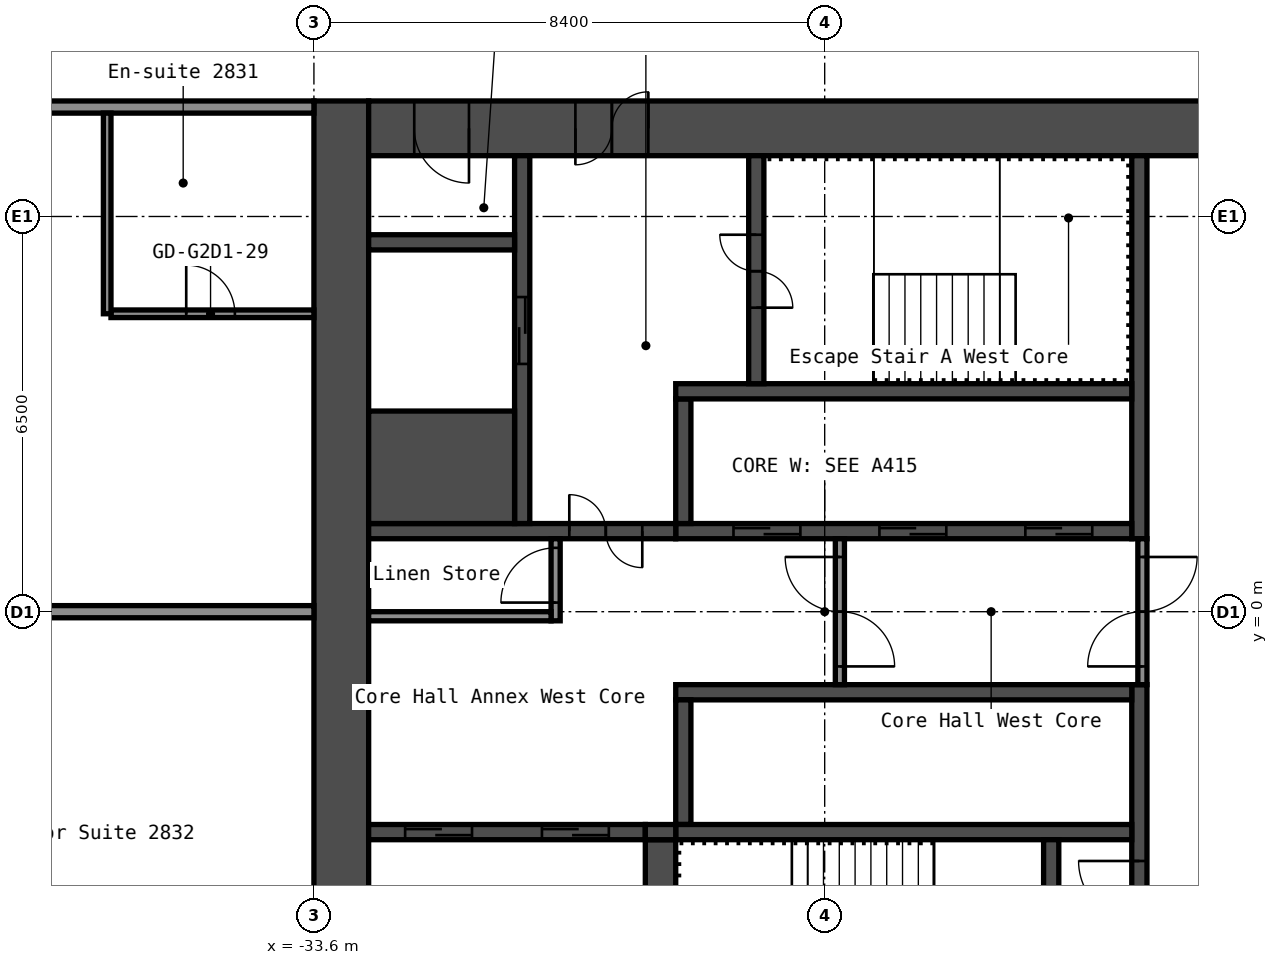
"""IFC4 building model, lengths in metres.
Left out: names, types, materials, properties, quantities, classifications, styles, units other than length and angle.
Written with IfcOpenShell. Run it as: python <this file> out.ifc"""

import sys

from ifc_helpers import new_model, si_unit, direction, frame, frame_2d, origin, place, context, subcontext, project, spatial, rectangle, extrude, element, fill, save


model = new_model("IFC4")
c1 = context("Model", 3, precision=1e-05, world=origin(), true_north=direction((0.0, 1.0)))
c2 = subcontext(c1, "Body", "Model", "MODEL_VIEW")
j1 = project(units=[si_unit("LENGTHUNIT", "METRE"), si_unit("PLANEANGLEUNIT", "RADIAN")], contexts=[c1])
p1 = place(None, origin())
s1 = spatial("IfcSite", under=j1, at=p1, CompositionType="ELEMENT")
p2 = place(p1, origin())
s2 = spatial("IfcBuilding", under=s1, at=p2, CompositionType="ELEMENT")
p3 = place(p2, frame((0.0, 0.0, 101.0)))
s3 = spatial("IfcBuildingStorey", under=s2, at=p3, CompositionType="ELEMENT", Elevation=101.0)
p4 = place(p3, frame((-33.15, -8.4, 0.0), z_axis=(0.0, 0.0, 1.0), x_axis=(0.0, 1.0, 0.0)))
e1 = element("IfcWall", 1, at=p4, inside=s3, PredefinedType="SHEAR", context=c2, shape_type="SweptSolid", body=[
    extrude(rectangle(XDim=16.8, YDim=0.9, at=frame_2d((8.4, 0.0))), origin(), (0.0, 0.0, 1.0), 2.8),
])
p5 = place(p3, frame((-32.7, 7.95, 0.0), z_axis=(0.0, 0.0, 1.0), x_axis=(1.0, 0.0, 0.0)))
e2 = element("IfcWall", 2, at=p5, inside=s3, PredefinedType="SHEAR", context=c2, shape_type="SweptSolid", body=[
    extrude(rectangle(XDim=15.0, YDim=0.9, at=frame_2d((7.5, 0.0))), origin(), (0.0, 0.0, 1.0), 2.8),
])
p6 = place(p5, frame((3.4, 0.0, 0.0)))
e3 = element("IfcOpeningElement", 3, at=p6, cuts=e2, PredefinedType="OPENING", context=c2, shape_type="SweptSolid", body=[
    extrude(rectangle(XDim=1.2, YDim=2.1, at=frame_2d((0.6, 1.05))), frame((0.0, 0.46, 0.0), z_axis=(0.0, -1.0, 0.0), x_axis=(1.0, 0.0, 0.0)), (0.0, 0.0, 1.0), 0.92),
])
p7 = place(p5, frame((0.75, 0.0, 0.0)))
e4 = element("IfcOpeningElement", 4, at=p7, cuts=e2, PredefinedType="OPENING", context=c2, shape_type="SweptSolid", body=[
    extrude(rectangle(XDim=0.9, YDim=2.1, at=frame_2d((0.45, 1.05))), frame((0.0, 0.46, 0.0), z_axis=(0.0, -1.0, 0.0), x_axis=(1.0, 0.0, 0.0)), (0.0, 0.0, 1.0), 0.92),
])
p8 = place(p3, frame((-20.025, 1.2, 0.0), z_axis=(0.0, 0.0, 1.0), x_axis=(0.0, 1.0, 0.0)))
e5 = element("IfcWall", 5, at=p8, inside=s3, PredefinedType="SHEAR", context=c2, shape_type="SweptSolid", body=[
    extrude(rectangle(XDim=6.3, YDim=0.25, at=frame_2d((3.15, 0.0))), origin(), (0.0, 0.0, 1.0), 2.8),
])
p9 = place(p3, frame((-20.025, -7.5, 0.0), z_axis=(0.0, 0.0, 1.0), x_axis=(0.0, 1.0, 0.0)))
e6 = element("IfcWall", 6, at=p9, inside=s3, PredefinedType="SHEAR", context=c2, shape_type="SweptSolid", body=[
    extrude(rectangle(XDim=6.3, YDim=0.25, at=frame_2d((3.15, 0.0))), origin(), (0.0, 0.0, 1.0), 2.8),
])
p10 = place(p9, frame((2.4, 0.0, 0.0)))
e7 = element("IfcOpeningElement", 7, at=p10, cuts=e6, PredefinedType="OPENING", context=c2, shape_type="SweptSolid", body=[
    extrude(rectangle(XDim=1.0, YDim=2.1, at=frame_2d((0.5, 1.05))), frame((0.0, 0.135, 0.0), z_axis=(0.0, -1.0, 0.0), x_axis=(1.0, 0.0, 0.0)), (0.0, 0.0, 1.0), 0.27),
])
p11 = place(p3, frame((-27.65, 1.325, 0.0), z_axis=(0.0, 0.0, 1.0), x_axis=(1.0, 0.0, 0.0)))
e8 = element("IfcWall", 8, at=p11, inside=s3, PredefinedType="SHEAR", context=c2, shape_type="SweptSolid", body=[
    extrude(rectangle(XDim=7.5, YDim=0.25, at=frame_2d((3.75, 0.0))), origin(), (0.0, 0.0, 1.0), 2.8),
])
p12 = place(p11, frame((5.75, 0.0, 0.0)))
e9 = element("IfcOpeningElement", 9, at=p12, cuts=e8, PredefinedType="OPENING", context=c2, shape_type="SweptSolid", body=[
    extrude(rectangle(XDim=1.1, YDim=2.1, at=frame_2d((0.55, 1.05))), frame((0.0, 0.135, 0.0), z_axis=(0.0, -1.0, 0.0), x_axis=(1.0, 0.0, 0.0)), (0.0, 0.0, 1.0), 0.27),
])
p13 = place(p11, frame((3.35, 0.0, 0.0)))
e10 = element("IfcOpeningElement", 10, at=p13, cuts=e8, PredefinedType="OPENING", context=c2, shape_type="SweptSolid", body=[
    extrude(rectangle(XDim=1.1, YDim=2.1, at=frame_2d((0.55, 1.05))), frame((0.0, 0.135, 0.0), z_axis=(0.0, -1.0, 0.0), x_axis=(1.0, 0.0, 0.0)), (0.0, 0.0, 1.0), 0.27),
])
p14 = place(p11, frame((0.95, 0.0, 0.0)))
e11 = element("IfcOpeningElement", 11, at=p14, cuts=e8, PredefinedType="OPENING", context=c2, shape_type="SweptSolid", body=[
    extrude(rectangle(XDim=1.1, YDim=2.1, at=frame_2d((0.55, 1.05))), frame((0.0, 0.135, 0.0), z_axis=(0.0, -1.0, 0.0), x_axis=(1.0, 0.0, 0.0)), (0.0, 0.0, 1.0), 0.27),
])
p15 = place(p3, frame((-27.525, 1.45, 0.0), z_axis=(0.0, 0.0, 1.0), x_axis=(0.0, 1.0, 0.0)))
e12 = element("IfcWall", 12, at=p15, inside=s3, PredefinedType="SHEAR", context=c2, shape_type="SweptSolid", body=[
    extrude(rectangle(XDim=2.05, YDim=0.25, at=frame_2d((1.025, 0.0))), origin(), (0.0, 0.0, 1.0), 2.8),
])
p16 = place(p3, frame((-27.65, 3.625, 0.0), z_axis=(0.0, 0.0, 1.0), x_axis=(1.0, 0.0, 0.0)))
e13 = element("IfcWall", 13, at=p16, inside=s3, PredefinedType="SHEAR", context=c2, shape_type="SweptSolid", body=[
    extrude(rectangle(XDim=7.5, YDim=0.25, at=frame_2d((3.75, 0.0))), origin(), (0.0, 0.0, 1.0), 2.8),
])
p17 = place(p3, frame((-26.325, 3.75, 0.0), z_axis=(0.0, 0.0, 1.0), x_axis=(0.0, 1.0, 0.0)))
e14 = element("IfcWall", 14, at=p17, inside=s3, PredefinedType="SHEAR", context=c2, shape_type="SweptSolid", body=[
    extrude(rectangle(XDim=3.75, YDim=0.25, at=frame_2d((1.875, 0.0))), origin(), (0.0, 0.0, 1.0), 2.8),
])
p18 = place(p17, frame((1.25, 0.0, 0.0)))
e15 = element("IfcOpeningElement", 15, at=p18, cuts=e14, PredefinedType="OPENING", context=c2, shape_type="SweptSolid", body=[
    extrude(rectangle(XDim=1.2, YDim=2.1, at=frame_2d((0.6, 1.05))), frame((0.0, 0.135, 0.0), z_axis=(0.0, -1.0, 0.0), x_axis=(1.0, 0.0, 0.0)), (0.0, 0.0, 1.0), 0.27),
])
p19 = place(p3, frame((-32.7, 1.325, 0.0), z_axis=(0.0, 0.0, 1.0), x_axis=(1.0, 0.0, 0.0)))
e16 = element("IfcWall", 16, at=p19, inside=s3, PredefinedType="SHEAR", context=c2, shape_type="SweptSolid", body=[
    extrude(rectangle(XDim=5.05, YDim=0.25, at=frame_2d((2.525, 0.0))), origin(), (0.0, 0.0, 1.0), 2.8),
])
p20 = place(p19, frame((3.3, 0.0, 0.0)))
e17 = element("IfcOpeningElement", 17, at=p20, cuts=e16, PredefinedType="OPENING", context=c2, shape_type="SweptSolid", body=[
    extrude(rectangle(XDim=1.2, YDim=2.1, at=frame_2d((0.6, 1.05))), frame((0.0, 0.135, 0.0), z_axis=(0.0, -1.0, 0.0), x_axis=(1.0, 0.0, 0.0)), (0.0, 0.0, 1.0), 0.27),
])
p21 = place(p3, frame((-30.175, 1.45, 0.0), z_axis=(0.0, 0.0, 1.0), x_axis=(0.0, 1.0, 0.0)))
e18 = element("IfcWall", 18, at=p21, inside=s3, PredefinedType="SHEAR", context=c2, shape_type="SweptSolid", body=[
    extrude(rectangle(XDim=6.05, YDim=0.25, at=frame_2d((3.025, 0.0))), origin(), (0.0, 0.0, 1.0), 2.8),
])
p22 = place(p21, frame((2.625, 0.0, 0.0)))
e19 = element("IfcOpeningElement", 19, at=p22, cuts=e18, PredefinedType="OPENING", context=c2, shape_type="SweptSolid", body=[
    extrude(rectangle(XDim=1.1, YDim=2.1, at=frame_2d((0.55, 1.05))), frame((0.0, 0.135, 0.0), z_axis=(0.0, -1.0, 0.0), x_axis=(1.0, 0.0, 0.0)), (0.0, 0.0, 1.0), 0.27),
])
p23 = place(p3, frame((-32.7, 2.375, 0.0), z_axis=(0.0, 0.0, 1.0), x_axis=(1.0, 0.0, 0.0)))
e20 = element("IfcWall", 20, at=p23, inside=s3, PredefinedType="SHEAR", context=c2, shape_type="SweptSolid", body=[
    extrude(rectangle(XDim=2.4, YDim=1.85, at=frame_2d((1.2, 0.0))), origin(), (0.0, 0.0, 1.0), 2.8),
])
p24 = place(p3, frame((-32.7, 6.075, 0.0), z_axis=(0.0, 0.0, 1.0), x_axis=(1.0, 0.0, 0.0)))
e21 = element("IfcWall", 21, at=p24, inside=s3, PredefinedType="SHEAR", context=c2, shape_type="SweptSolid", body=[
    extrude(rectangle(XDim=2.4, YDim=0.25, at=frame_2d((1.2, 0.0))), origin(), (0.0, 0.0, 1.0), 2.8),
])
p25 = place(p3, frame((-27.65, -1.325, 0.0), z_axis=(0.0, 0.0, 1.0), x_axis=(1.0, 0.0, 0.0)))
e22 = element("IfcWall", 22, at=p25, inside=s3, PredefinedType="SHEAR", context=c2, shape_type="SweptSolid", body=[
    extrude(rectangle(XDim=7.5, YDim=0.25, at=frame_2d((3.75, 0.0))), origin(), (0.0, 0.0, 1.0), 2.8),
])
p26 = place(p3, frame((-27.525, -3.5, 0.0), z_axis=(0.0, 0.0, 1.0), x_axis=(0.0, 1.0, 0.0)))
e23 = element("IfcWall", 23, at=p26, inside=s3, PredefinedType="SHEAR", context=c2, shape_type="SweptSolid", body=[
    extrude(rectangle(XDim=2.05, YDim=0.25, at=frame_2d((1.025, 0.0))), origin(), (0.0, 0.0, 1.0), 2.8),
])
p27 = place(p3, frame((-27.65, -3.625, 0.0), z_axis=(0.0, 0.0, 1.0), x_axis=(1.0, 0.0, 0.0)))
e24 = element("IfcWall", 24, at=p27, inside=s3, PredefinedType="SHEAR", context=c2, shape_type="SweptSolid", body=[
    extrude(rectangle(XDim=7.5, YDim=0.25, at=frame_2d((3.75, 0.0))), origin(), (0.0, 0.0, 1.0), 2.8),
])
p28 = place(p3, frame((-21.475, -7.5, 0.0), z_axis=(0.0, 0.0, 1.0), x_axis=(0.0, 1.0, 0.0)))
e25 = element("IfcWall", 25, at=p28, inside=s3, PredefinedType="SHEAR", context=c2, shape_type="SweptSolid", body=[
    extrude(rectangle(XDim=3.75, YDim=0.25, at=frame_2d((1.875, 0.0))), origin(), (0.0, 0.0, 1.0), 2.8),
])
p29 = place(p28, frame((1.3, 0.0, 0.0)))
e26 = element("IfcOpeningElement", 26, at=p29, cuts=e25, PredefinedType="OPENING", context=c2, shape_type="SweptSolid", body=[
    extrude(rectangle(XDim=1.2, YDim=2.1, at=frame_2d((0.6, 1.05))), frame((0.0, 0.135, 0.0), z_axis=(0.0, -1.0, 0.0), x_axis=(1.0, 0.0, 0.0)), (0.0, 0.0, 1.0), 0.27),
])
p30 = place(p3, frame((-27.9, -7.5, 0.0), z_axis=(0.0, 0.0, 1.0), x_axis=(0.0, 1.0, 0.0)))
e27 = element("IfcWall", 27, at=p30, inside=s3, PredefinedType="SHEAR", context=c2, shape_type="SweptSolid", body=[
    extrude(rectangle(XDim=3.75, YDim=0.5, at=frame_2d((1.875, 0.0))), origin(), (0.0, 0.0, 1.0), 2.8),
])
p31 = place(p3, frame((-32.7, -3.625, 0.0), z_axis=(0.0, 0.0, 1.0), x_axis=(1.0, 0.0, 0.0)))
e28 = element("IfcWall", 28, at=p31, inside=s3, PredefinedType="SHEAR", context=c2, shape_type="SweptSolid", body=[
    extrude(rectangle(XDim=4.55, YDim=0.25, at=frame_2d((2.275, 0.0))), origin(), (0.0, 0.0, 1.0), 2.8),
])
p32 = place(p31, frame((2.85, 0.0, 0.0)))
e29 = element("IfcOpeningElement", 29, at=p32, cuts=e28, PredefinedType="OPENING", context=c2, shape_type="SweptSolid", body=[
    extrude(rectangle(XDim=1.1, YDim=2.1, at=frame_2d((0.55, 1.05))), frame((0.0, 0.135, 0.0), z_axis=(0.0, -1.0, 0.0), x_axis=(1.0, 0.0, 0.0)), (0.0, 0.0, 1.0), 0.27),
])
p33 = place(p31, frame((0.6, 0.0, 0.0)))
e30 = element("IfcOpeningElement", 30, at=p33, cuts=e28, PredefinedType="OPENING", context=c2, shape_type="SweptSolid", body=[
    extrude(rectangle(XDim=1.1, YDim=2.1, at=frame_2d((0.55, 1.05))), frame((0.0, 0.135, 0.0), z_axis=(0.0, -1.0, 0.0), x_axis=(1.0, 0.0, 0.0)), (0.0, 0.0, 1.0), 0.27),
])
p34 = place(p3, frame((-28.15, -3.625, 0.0), z_axis=(0.0, 0.0, 1.0), x_axis=(1.0, 0.0, 0.0)))
e31 = element("IfcWall", 31, at=p34, inside=s3, PredefinedType="SHEAR", context=c2, shape_type="SweptSolid", body=[
    extrude(rectangle(XDim=0.5, YDim=0.25, at=frame_2d((0.25, 0.0))), origin(), (0.0, 0.0, 1.0), 2.8),
])
p35 = place(p3, frame((-19.975, -1.2, 0.0), z_axis=(0.0, 0.0, 1.0), x_axis=(0.0, 1.0, 0.0)))
e32 = element("IfcWall", 32, at=p35, inside=s3, PredefinedType="PARTITIONING", context=c2, shape_type="SweptSolid", body=[
    extrude(rectangle(XDim=2.4, YDim=0.15, at=frame_2d((1.2, 0.0))), origin(), (0.0, 0.0, 1.0), 2.8),
])
p36 = place(p35, frame((0.3, 0.0, 0.0)))
e33 = element("IfcOpeningElement", 33, at=p36, cuts=e32, PredefinedType="OPENING", context=c2, shape_type="SweptSolid", body=[
    extrude(rectangle(XDim=1.8, YDim=2.1, at=frame_2d((0.9, 1.05))), frame((0.0, 0.085, 0.0), z_axis=(0.0, -1.0, 0.0), x_axis=(1.0, 0.0, 0.0)), (0.0, 0.0, 1.0), 0.17),
])
p37 = place(p3, frame((-24.95, -1.2, 0.0), z_axis=(0.0, 0.0, 1.0), x_axis=(0.0, 1.0, 0.0)))
e34 = element("IfcWall", 34, at=p37, inside=s3, PredefinedType="PARTITIONING", context=c2, shape_type="SweptSolid", body=[
    extrude(rectangle(XDim=2.4, YDim=0.15, at=frame_2d((1.2, 0.0))), origin(), (0.0, 0.0, 1.0), 2.8),
])
p38 = place(p37, frame((0.3, 0.0, 0.0)))
e35 = element("IfcOpeningElement", 35, at=p38, cuts=e34, PredefinedType="OPENING", context=c2, shape_type="SweptSolid", body=[
    extrude(rectangle(XDim=1.8, YDim=2.1, at=frame_2d((0.9, 1.05))), frame((0.0, 0.085, 0.0), z_axis=(0.0, -1.0, 0.0), x_axis=(1.0, 0.0, 0.0)), (0.0, 0.0, 1.0), 0.17),
])
p39 = place(p3, frame((-29.625, -0.15, 0.0), z_axis=(0.0, 0.0, 1.0), x_axis=(0.0, 1.0, 0.0)))
e36 = element("IfcWall", 36, at=p39, inside=s3, PredefinedType="PARTITIONING", context=c2, shape_type="SweptSolid", body=[
    extrude(rectangle(XDim=1.35, YDim=0.15, at=frame_2d((0.675, 0.0))), origin(), (0.0, 0.0, 1.0), 2.8),
])
p40 = place(p39, frame((0.3, 0.0, 0.0)))
e37 = element("IfcOpeningElement", 37, at=p40, cuts=e36, PredefinedType="OPENING", context=c2, shape_type="SweptSolid", body=[
    extrude(rectangle(XDim=0.9, YDim=2.1, at=frame_2d((0.45, 1.05))), frame((0.0, 0.085, 0.0), z_axis=(0.0, -1.0, 0.0), x_axis=(1.0, 0.0, 0.0)), (0.0, 0.0, 1.0), 0.17),
])
p41 = place(p3, frame((-32.7, -0.075, 0.0), z_axis=(0.0, 0.0, 1.0), x_axis=(1.0, 0.0, 0.0)))
e38 = element("IfcWall", 38, at=p41, inside=s3, PredefinedType="PARTITIONING", context=c2, shape_type="SweptSolid", body=[
    extrude(rectangle(XDim=3.0, YDim=0.15, at=frame_2d((1.5, 0.0))), origin(), (0.0, 0.0, 1.0), 2.8),
])
p42 = place(p3, frame((-43.9, 0.0, 0.0), z_axis=(0.0, 0.0, 1.0), x_axis=(1.0, 0.0, 0.0)))
e39 = element("IfcWall", 39, at=p42, inside=s3, PredefinedType="PARTITIONING", context=c2, shape_type="SweptSolid", body=[
    extrude(rectangle(XDim=10.3, YDim=0.2, at=frame_2d((5.15, 0.0))), origin(), (0.0, 0.0, 1.0), 2.8),
])
p43 = place(p3, frame((-36.938, 4.9, 0.0), z_axis=(0.0, 0.0, 1.0), x_axis=(1.0, 0.0, 0.0)))
e40 = element("IfcWall", 40, at=p43, inside=s3, PredefinedType="PARTITIONING", context=c2, shape_type="SweptSolid", body=[
    extrude(rectangle(XDim=3.337, YDim=0.125, at=frame_2d((1.669, 0.0))), origin(), (0.0, 0.0, 1.0), 2.8),
])
p44 = place(p43, frame((1.238, 0.0, 0.0)))
e41 = element("IfcOpeningElement", 41, at=p44, cuts=e40, PredefinedType="OPENING", context=c2, shape_type="SweptSolid", body=[
    extrude(rectangle(XDim=0.8, YDim=2.1, at=frame_2d((0.4, 1.05))), frame((0.0, 0.073, 0.0), z_axis=(0.0, -1.0, 0.0), x_axis=(1.0, 0.0, 0.0)), (0.0, 0.0, 1.0), 0.145),
])
p45 = place(p3, frame((-44.0, 8.3, 0.0), z_axis=(0.0, 0.0, 1.0), x_axis=(1.0, 0.0, 0.0)))
e42 = element("IfcWall", 42, at=p45, inside=s3, PredefinedType="PARTITIONING", context=c2, shape_type="SweptSolid", body=[
    extrude(rectangle(XDim=10.4, YDim=0.2, at=frame_2d((5.2, 0.0))), origin(), (0.0, 0.0, 1.0), 2.8),
])
p46 = place(p45, frame((3.05, 0.0, 0.0)))
e43 = element("IfcOpeningElement", 43, at=p46, cuts=e42, PredefinedType="OPENING", context=c2, shape_type="SweptSolid", body=[
    extrude(rectangle(XDim=1.0, YDim=2.1, at=frame_2d((0.5, 1.05))), frame((0.0, 0.11, 0.0), z_axis=(0.0, -1.0, 0.0), x_axis=(1.0, 0.0, 0.0)), (0.0, 0.0, 1.0), 0.22),
])
p47 = place(p3, frame((-37.0, 4.9, 0.0), z_axis=(0.0, 0.0, 1.0), x_axis=(0.0, 1.0, 0.0)))
e44 = element("IfcWall", 44, at=p47, inside=s3, PredefinedType="PARTITIONING", context=c2, shape_type="SweptSolid", body=[
    extrude(rectangle(XDim=3.3, YDim=0.125, at=frame_2d((1.65, 0.0))), origin(), (0.0, 0.0, 1.0), 2.8),
])
p48 = place(p6, origin())
e45 = element("IfcDoor", 45, at=p48, inside=s3, OperationType="DOUBLE_DOOR_SINGLE_SWING", PredefinedType="DOOR", context=c2, shape_type="SweptSolid", body=[
    extrude(rectangle(XDim=1.2, YDim=2.1, at=frame_2d((0.6, 1.05))), frame((0.0, 0.025, 0.0), z_axis=(0.0, -1.0, 0.0), x_axis=(1.0, 0.0, 0.0)), (0.0, 0.0, 1.0), 0.05),
])
fill(e3, e45)
p49 = place(p7, origin())
e46 = element("IfcDoor", 46, at=p49, inside=s3, OperationType="SINGLE_SWING_RIGHT", PredefinedType="DOOR", context=c2, shape_type="SweptSolid", body=[
    extrude(rectangle(XDim=0.9, YDim=2.1, at=frame_2d((0.45, 1.05))), frame((0.0, 0.025, 0.0), z_axis=(0.0, -1.0, 0.0), x_axis=(1.0, 0.0, 0.0)), (0.0, 0.0, 1.0), 0.05),
])
fill(e4, e46)
p50 = place(p18, origin())
e47 = element("IfcDoor", 47, at=p50, inside=s3, OperationType="DOUBLE_DOOR_SINGLE_SWING", PredefinedType="DOOR", context=c2, shape_type="SweptSolid", body=[
    extrude(rectangle(XDim=1.2, YDim=2.1, at=frame_2d((0.6, 1.05))), frame((0.0, 0.025, 0.0), z_axis=(0.0, -1.0, 0.0), x_axis=(1.0, 0.0, 0.0)), (0.0, 0.0, 1.0), 0.05),
])
fill(e15, e47)
p51 = place(p10, origin())
e48 = element("IfcDoor", 48, at=p51, inside=s3, OperationType="SINGLE_SWING_LEFT", PredefinedType="DOOR", context=c2, shape_type="SweptSolid", body=[
    extrude(rectangle(XDim=1.0, YDim=2.1, at=frame_2d((0.5, 1.05))), frame((0.0, 0.025, 0.0), z_axis=(0.0, -1.0, 0.0), x_axis=(1.0, 0.0, 0.0)), (0.0, 0.0, 1.0), 0.05),
])
fill(e7, e48)
p52 = place(p20, origin())
e49 = element("IfcDoor", 49, at=p52, inside=s3, OperationType="DOUBLE_DOOR_SINGLE_SWING", PredefinedType="DOOR", context=c2, shape_type="SweptSolid", body=[
    extrude(rectangle(XDim=1.2, YDim=2.1, at=frame_2d((0.6, 1.05))), frame((0.0, 0.025, 0.0), z_axis=(0.0, -1.0, 0.0), x_axis=(1.0, 0.0, 0.0)), (0.0, 0.0, 1.0), 0.05),
])
fill(e17, e49)
p53 = place(p36, origin())
e50 = element("IfcDoor", 50, at=p53, inside=s3, OperationType="DOUBLE_DOOR_SINGLE_SWING", PredefinedType="DOOR", context=c2, shape_type="SweptSolid", body=[
    extrude(rectangle(XDim=1.8, YDim=2.1, at=frame_2d((0.9, 1.05))), frame((0.0, 0.025, 0.0), z_axis=(0.0, -1.0, 0.0), x_axis=(1.0, 0.0, 0.0)), (0.0, 0.0, 1.0), 0.05),
])
fill(e33, e50)
p54 = place(p38, origin())
e51 = element("IfcDoor", 51, at=p54, inside=s3, OperationType="DOUBLE_DOOR_SINGLE_SWING", PredefinedType="DOOR", context=c2, shape_type="SweptSolid", body=[
    extrude(rectangle(XDim=1.8, YDim=2.1, at=frame_2d((0.9, 1.05))), frame((0.0, 0.025, 0.0), z_axis=(0.0, -1.0, 0.0), x_axis=(1.0, 0.0, 0.0)), (0.0, 0.0, 1.0), 0.05),
])
fill(e35, e51)
p55 = place(p40, origin())
e52 = element("IfcDoor", 52, at=p55, inside=s3, OperationType="SINGLE_SWING_RIGHT", PredefinedType="DOOR", context=c2, shape_type="SweptSolid", body=[
    extrude(rectangle(XDim=0.9, YDim=2.1, at=frame_2d((0.45, 1.05))), frame((0.0, 0.025, 0.0), z_axis=(0.0, -1.0, 0.0), x_axis=(1.0, 0.0, 0.0)), (0.0, 0.0, 1.0), 0.05),
])
fill(e37, e52)
p56 = place(p12, origin())
e53 = element("IfcDoor", 53, at=p56, inside=s3, OperationType="DOUBLE_DOOR_SLIDING", PredefinedType="DOOR", context=c2, shape_type="SweptSolid", body=[
    extrude(rectangle(XDim=1.1, YDim=2.1, at=frame_2d((0.55, 1.05))), frame((0.0, 0.025, 0.0), z_axis=(0.0, -1.0, 0.0), x_axis=(1.0, 0.0, 0.0)), (0.0, 0.0, 1.0), 0.05),
])
fill(e9, e53)
p57 = place(p13, origin())
e54 = element("IfcDoor", 54, at=p57, inside=s3, OperationType="DOUBLE_DOOR_SLIDING", PredefinedType="DOOR", context=c2, shape_type="SweptSolid", body=[
    extrude(rectangle(XDim=1.1, YDim=2.1, at=frame_2d((0.55, 1.05))), frame((0.0, 0.025, 0.0), z_axis=(0.0, -1.0, 0.0), x_axis=(1.0, 0.0, 0.0)), (0.0, 0.0, 1.0), 0.05),
])
fill(e10, e54)
p58 = place(p14, origin())
e55 = element("IfcDoor", 55, at=p58, inside=s3, OperationType="DOUBLE_DOOR_SLIDING", PredefinedType="DOOR", context=c2, shape_type="SweptSolid", body=[
    extrude(rectangle(XDim=1.1, YDim=2.1, at=frame_2d((0.55, 1.05))), frame((0.0, 0.025, 0.0), z_axis=(0.0, -1.0, 0.0), x_axis=(1.0, 0.0, 0.0)), (0.0, 0.0, 1.0), 0.05),
])
fill(e11, e55)
p59 = place(p22, origin())
e56 = element("IfcDoor", 56, at=p59, inside=s3, OperationType="DOUBLE_DOOR_SLIDING", PredefinedType="DOOR", context=c2, shape_type="SweptSolid", body=[
    extrude(rectangle(XDim=1.1, YDim=2.1, at=frame_2d((0.55, 1.05))), frame((0.0, 0.025, 0.0), z_axis=(0.0, -1.0, 0.0), x_axis=(1.0, 0.0, 0.0)), (0.0, 0.0, 1.0), 0.05),
])
fill(e19, e56)
p60 = place(p32, origin())
e57 = element("IfcDoor", 57, at=p60, inside=s3, OperationType="DOUBLE_DOOR_SLIDING", PredefinedType="DOOR", context=c2, shape_type="SweptSolid", body=[
    extrude(rectangle(XDim=1.1, YDim=2.1, at=frame_2d((0.55, 1.05))), frame((0.0, 0.025, 0.0), z_axis=(0.0, -1.0, 0.0), x_axis=(1.0, 0.0, 0.0)), (0.0, 0.0, 1.0), 0.05),
])
fill(e29, e57)
p61 = place(p33, origin())
e58 = element("IfcDoor", 58, at=p61, inside=s3, OperationType="DOUBLE_DOOR_SLIDING", PredefinedType="DOOR", context=c2, shape_type="SweptSolid", body=[
    extrude(rectangle(XDim=1.1, YDim=2.1, at=frame_2d((0.55, 1.05))), frame((0.0, 0.025, 0.0), z_axis=(0.0, -1.0, 0.0), x_axis=(1.0, 0.0, 0.0)), (0.0, 0.0, 1.0), 0.05),
])
fill(e30, e58)
p62 = place(p44, origin())
e59 = element("IfcDoor", 59, at=p62, inside=s3, OperationType="SINGLE_SWING_RIGHT", PredefinedType="DOOR", context=c2, shape_type="SweptSolid", body=[
    extrude(rectangle(XDim=0.8, YDim=2.1, at=frame_2d((0.4, 1.05))), frame((0.0, 0.025, 0.0), z_axis=(0.0, -1.0, 0.0), x_axis=(1.0, 0.0, 0.0)), (0.0, 0.0, 1.0), 0.05),
])
fill(e41, e59)
save(model, sys.argv[1])
